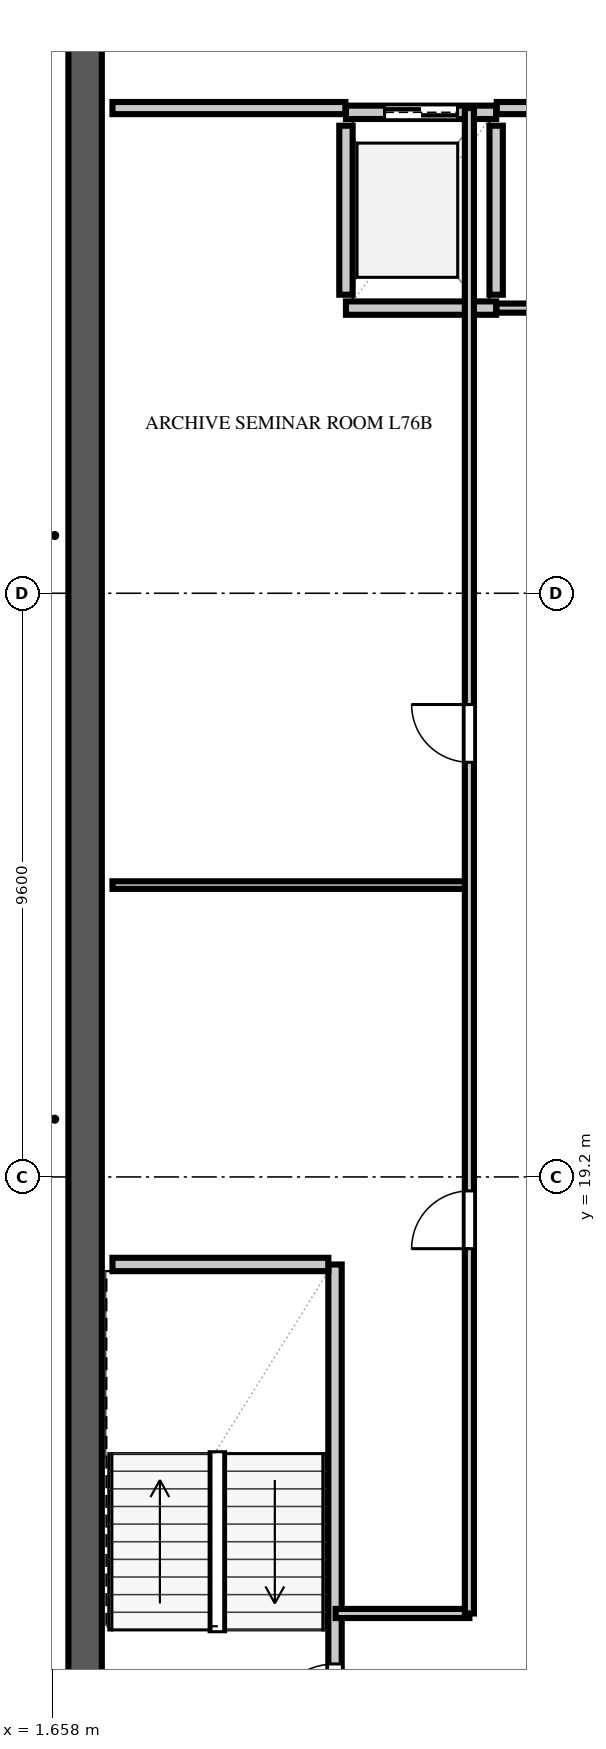
"""IFC4 building model, lengths in metres.
Left out: names, types, materials, properties, quantities, classifications, styles, units other than length and angle.
Written with IfcOpenShell. Run it as: python <this file> out.ifc"""

import sys

from ifc_helpers import new_model, si_unit, direction, frame, frame_2d, origin, place, context, subcontext, project, spatial, rectangle, extrude, element, fill, save


model = new_model("IFC4")
c1 = context("Model", 3, precision=1e-05, world=origin(), true_north=direction((0.0, 1.0)))
c2 = subcontext(c1, "Body", "Model", "MODEL_VIEW")
j1 = project(units=[si_unit("LENGTHUNIT", "METRE"), si_unit("PLANEANGLEUNIT", "RADIAN")], contexts=[c1])
p1 = place(None, origin())
s1 = spatial("IfcSite", under=j1, at=p1, CompositionType="ELEMENT")
p2 = place(p1, origin())
s2 = spatial("IfcBuilding", under=s1, at=p2, CompositionType="ELEMENT")
p3 = place(p2, frame((0.0, 0.0, 300.0)))
s3 = spatial("IfcBuildingStorey", under=s2, at=p3, CompositionType="ELEMENT", Elevation=300.0)
p4 = place(p3, frame((2.2, 9.325, 0.0), z_axis=(0.0, 0.0, 1.0), x_axis=(0.0, 1.0, 0.0)))
e1 = element("IfcWall", 1, at=p4, inside=s3, PredefinedType="SHEAR", context=c2, shape_type="SweptSolid", body=[
    extrude(rectangle(XDim=38.95, YDim=0.55, at=frame_2d((19.475, 0.0))), origin(), (0.0, 0.0, 1.0), 3.54),
])
p5 = place(p3, frame((6.31, 9.95, 0.0), z_axis=(0.0, 0.0, 1.0), x_axis=(0.0, 1.0, 0.0)))
e2 = element("IfcWall", 2, at=p5, inside=s3, PredefinedType="SOLIDWALL", context=c2, shape_type="SweptSolid", body=[
    extrude(rectangle(XDim=7.81, YDim=0.22, at=frame_2d((3.905, 0.0))), origin(), (0.0, 0.0, 1.0), 3.54),
])
p6 = place(p5, frame((0.14, 0.0, 0.0)))
e3 = element("IfcOpeningElement", 3, at=p6, cuts=e2, PredefinedType="OPENING", context=c2, shape_type="SweptSolid", body=[
    extrude(rectangle(XDim=1.1, YDim=2.2, at=frame_2d((0.55, 1.1))), frame((0.0, 0.122, 0.0), z_axis=(0.0, -1.0, 0.0), x_axis=(1.0, 0.0, 0.0)), (0.0, 0.0, 1.0), 0.244),
])
p7 = place(p3, frame((2.65, 17.76, 0.0), z_axis=(0.0, 0.0, 1.0), x_axis=(1.0, 0.0, 0.0)))
e4 = element("IfcWall", 4, at=p7, inside=s3, PredefinedType="SOLIDWALL", context=c2, shape_type="SweptSolid", body=[
    extrude(rectangle(XDim=3.55, YDim=0.22, at=frame_2d((1.775, 0.0))), origin(), (0.0, 0.0, 1.0), 3.54),
])
for number, where, z_axis, x_axis in (
    (5, (6.49, 33.71, 0.0), (0.0, 0.0, 1.0), (0.0, 1.0, 0.0)),
    (6, (8.96, 33.71, 0.0), (0.0, 0.0, 1.0), (0.0, 1.0, 0.0)),
):
    element("IfcWall", number, at=place(p3, frame(where, z_axis=z_axis, x_axis=x_axis)), inside=s3, PredefinedType="SOLIDWALL", context=c2, shape_type="SweptSolid", body=[
        extrude(rectangle(XDim=2.78, YDim=0.22, at=frame_2d((1.39, 0.0))), origin(), (0.0, 0.0, 1.0), 3.54),
    ])
p8 = place(p3, frame((6.49, 33.49, 0.0), z_axis=(0.0, 0.0, 1.0), x_axis=(1.0, 0.0, 0.0)))
e7 = element("IfcWall", 7, at=p8, inside=s3, PredefinedType="SOLIDWALL", context=c2, shape_type="SweptSolid", body=[
    extrude(rectangle(XDim=2.47, YDim=0.22, at=frame_2d((1.235, 0.0))), origin(), (0.0, 0.0, 1.0), 3.54),
])
p9 = place(p3, frame((6.49, 36.71, 0.0), z_axis=(0.0, 0.0, 1.0), x_axis=(1.0, 0.0, 0.0)))
e8 = element("IfcWall", 8, at=p9, inside=s3, PredefinedType="SOLIDWALL", context=c2, shape_type="SweptSolid", body=[
    extrude(rectangle(XDim=2.47, YDim=0.22, at=frame_2d((1.235, 0.0))), origin(), (0.0, 0.0, 1.0), 3.54),
])
p10 = place(p9, frame((0.635, 0.0, 0.0)))
e9 = element("IfcOpeningElement", 9, at=p10, cuts=e8, PredefinedType="OPENING", context=c2, shape_type="SweptSolid", body=[
    extrude(rectangle(XDim=1.2, YDim=2.2, at=frame_2d((0.6, 1.1))), frame((0.0, 0.122, 0.0), z_axis=(0.0, -1.0, 0.0), x_axis=(1.0, 0.0, 0.0)), (0.0, 0.0, 1.0), 0.244),
])
p11 = place(p3, frame((2.65, 36.78, 0.0), z_axis=(0.0, 0.0, 1.0), x_axis=(1.0, 0.0, 0.0)))
e10 = element("IfcWall", 10, at=p11, inside=s3, PredefinedType="SOLIDWALL", context=c2, shape_type="SweptSolid", body=[
    extrude(rectangle(XDim=3.83, YDim=0.2, at=frame_2d((1.915, 0.0))), origin(), (0.0, 0.0, 1.0), 3.54),
])
p12 = place(p3, frame((8.97, 36.78, 0.0), z_axis=(0.0, 0.0, 1.0), x_axis=(1.0, 0.0, 0.0)))
e11 = element("IfcWall", 11, at=p12, inside=s3, PredefinedType="SOLIDWALL", context=c2, shape_type="SweptSolid", body=[
    extrude(rectangle(XDim=1.51, YDim=0.2, at=frame_2d((0.755, 0.0))), origin(), (0.0, 0.0, 1.0), 3.54),
])
p13 = place(p3, frame((8.965, 33.49, 0.0), z_axis=(0.0, 0.0, 1.0), x_axis=(1.0, 0.0, 0.0)))
e12 = element("IfcWall", 12, at=p13, inside=s3, PredefinedType="PARTITIONING", context=c2, shape_type="SweptSolid", body=[
    extrude(rectangle(XDim=1.52, YDim=0.15, at=frame_2d((0.76, 0.0))), origin(), (0.0, 0.0, 1.0), 3.54),
])
p14 = place(p3, frame((6.32, 12.02, 0.0), z_axis=(0.0, 0.0, 1.0), x_axis=(1.0, 0.0, 0.0)))
e13 = element("IfcWall", 13, at=p14, inside=s3, PredefinedType="PARTITIONING", context=c2, shape_type="SweptSolid", body=[
    extrude(rectangle(XDim=2.2, YDim=0.15, at=frame_2d((1.1, 0.0))), origin(), (0.0, 0.0, 1.0), 3.54),
])
p15 = place(p3, frame((2.65, 24.0, 0.0), z_axis=(0.0, 0.0, 1.0), x_axis=(1.0, 0.0, 0.0)))
e14 = element("IfcWall", 14, at=p15, inside=s3, PredefinedType="PARTITIONING", context=c2, shape_type="SweptSolid", body=[
    extrude(rectangle(XDim=5.87, YDim=0.125, at=frame_2d((2.935, 0.0))), origin(), (0.0, 0.0, 1.0), 3.54),
])
p16 = place(p3, frame((8.52, 12.02, 0.0), z_axis=(0.0, 0.0, 1.0), x_axis=(0.0, 1.0, 0.0)))
e15 = element("IfcWall", 15, at=p16, inside=s3, PredefinedType="PARTITIONING", context=c2, shape_type="SweptSolid", body=[
    extrude(rectangle(XDim=24.76, YDim=0.15, at=frame_2d((12.38, 0.0))), origin(), (0.0, 0.0, 1.0), 3.54),
])
p17 = place(p16, frame((6.0, 0.0, 0.0)))
e16 = element("IfcOpeningElement", 16, at=p17, cuts=e15, PredefinedType="OPENING", context=c2, shape_type="SweptSolid", body=[
    extrude(rectangle(XDim=0.95, YDim=2.15, at=frame_2d((0.475, 1.075))), frame((0.0, 0.087, 0.0), z_axis=(0.0, -1.0, 0.0), x_axis=(1.0, 0.0, 0.0)), (0.0, 0.0, 1.0), 0.174),
])
p18 = place(p16, frame((14.0, 0.0, 0.0)))
e17 = element("IfcOpeningElement", 17, at=p18, cuts=e15, PredefinedType="OPENING", context=c2, shape_type="SweptSolid", body=[
    extrude(rectangle(XDim=0.95, YDim=2.15, at=frame_2d((0.475, 1.075))), frame((0.0, 0.087, 0.0), z_axis=(0.0, -1.0, 0.0), x_axis=(1.0, 0.0, 0.0)), (0.0, 0.0, 1.0), 0.174),
])
p19 = place(p6, origin())
e18 = element("IfcDoor", 18, at=p19, inside=s3, OperationType="SINGLE_SWING_LEFT", PredefinedType="DOOR", context=c2, shape_type="SweptSolid", body=[
    extrude(rectangle(XDim=1.1, YDim=2.2, at=frame_2d((0.55, 1.1))), frame((0.0, 0.025, 0.0), z_axis=(0.0, -1.0, 0.0), x_axis=(1.0, 0.0, 0.0)), (0.0, 0.0, 1.0), 0.05),
])
fill(e3, e18)
p20 = place(p10, origin())
e19 = element("IfcDoor", 19, at=p20, inside=s3, OperationType="DOUBLE_DOOR_SLIDING", PredefinedType="DOOR", context=c2, shape_type="SweptSolid", body=[
    extrude(rectangle(XDim=1.2, YDim=2.2, at=frame_2d((0.6, 1.1))), frame((0.0, 0.025, 0.0), z_axis=(0.0, -1.0, 0.0), x_axis=(1.0, 0.0, 0.0)), (0.0, 0.0, 1.0), 0.05),
])
fill(e9, e19)
p21 = place(p17, origin())
e20 = element("IfcDoor", 20, at=p21, inside=s3, OperationType="SINGLE_SWING_LEFT", PredefinedType="DOOR", context=c2, shape_type="SweptSolid", body=[
    extrude(rectangle(XDim=0.95, YDim=2.15, at=frame_2d((0.475, 1.075))), frame((0.0, 0.025, 0.0), z_axis=(0.0, -1.0, 0.0), x_axis=(1.0, 0.0, 0.0)), (0.0, 0.0, 1.0), 0.05),
])
fill(e16, e20)
p22 = place(p18, origin())
e21 = element("IfcDoor", 21, at=p22, inside=s3, OperationType="SINGLE_SWING_RIGHT", PredefinedType="DOOR", context=c2, shape_type="SweptSolid", body=[
    extrude(rectangle(XDim=0.95, YDim=2.15, at=frame_2d((0.475, 1.075))), frame((0.0, 0.025, 0.0), z_axis=(0.0, -1.0, 0.0), x_axis=(1.0, 0.0, 0.0)), (0.0, 0.0, 1.0), 0.05),
])
fill(e17, e21)
save(model, sys.argv[1])
